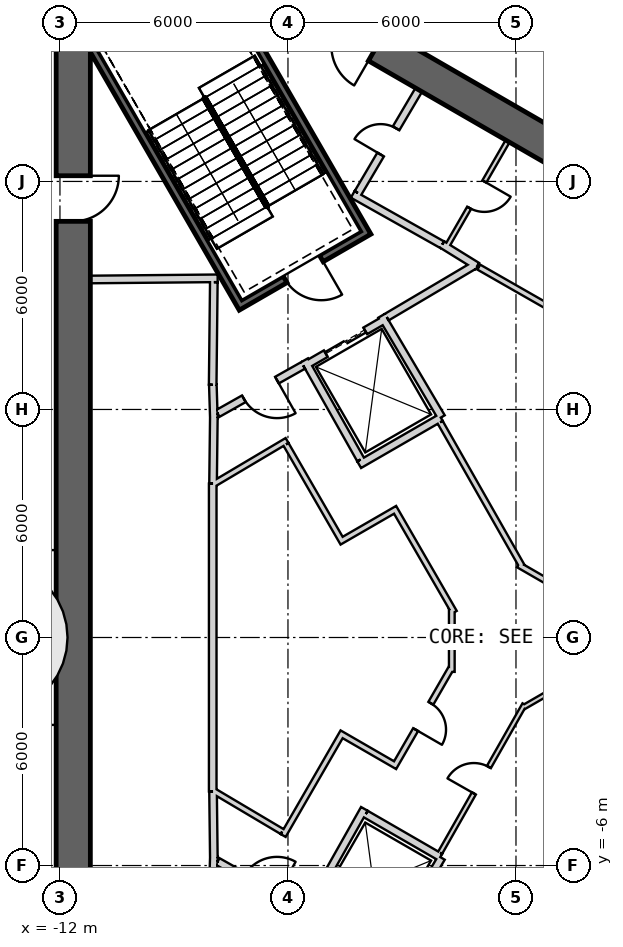
"""IFC4 building model, lengths in metres.
Left out: names, types, materials, properties, quantities, classifications, styles, units other than length and angle.
Written with IfcOpenShell. Run it as: python <this file> out.ifc"""

import sys

from ifc_helpers import new_model, si_unit, direction, frame, frame_2d, origin, place, context, subcontext, project, spatial, rectangle, extrude, element, fill, save


model = new_model("IFC4")
c1 = context("Model", 3, precision=1e-05, world=origin(), true_north=direction((0.0, 1.0)))
c2 = subcontext(c1, "Body", "Model", "MODEL_VIEW")
j1 = project(units=[si_unit("LENGTHUNIT", "METRE"), si_unit("PLANEANGLEUNIT", "RADIAN")], contexts=[c1])
p1 = place(None, origin())
s1 = spatial("IfcSite", under=j1, at=p1, CompositionType="ELEMENT")
p2 = place(p1, origin())
s2 = spatial("IfcBuilding", under=s1, at=p2, CompositionType="ELEMENT")
p3 = place(p2, frame((0.0, 0.0, 283.7)))
s3 = spatial("IfcBuildingStorey", under=s2, at=p3, CompositionType="ELEMENT", Elevation=283.7)
p4 = place(p3, frame((19.475, 2.208, 0.0), z_axis=(0.0, 0.0, 1.0), x_axis=(-0.866028369851, 0.499994862586, 0.0)))
e1 = element("IfcWall", 1, at=p4, inside=s3, PredefinedType="SHEAR", context=c2, shape_type="SweptSolid", body=[
    extrude(rectangle(XDim=31.523, YDim=0.9, at=frame_2d((15.762, 0.0))), origin(), (0.0, 0.0, 1.0), 9.0),
])
p5 = place(p4, frame((3.612, 0.0, 0.0)))
e2 = element("IfcOpeningElement", 2, at=p5, cuts=e1, PredefinedType="OPENING", context=c2, shape_type="SweptSolid", body=[
    extrude(rectangle(XDim=1.2, YDim=2.4, at=frame_2d((0.6, 1.2))), frame((0.0, 0.46, 0.0), z_axis=(0.0, -1.0, 0.0), x_axis=(1.0, 0.0, 0.0)), (0.0, 0.0, 1.0), 0.92),
])
p6 = place(p4, frame((26.712, 0.0, 0.0)))
e3 = element("IfcOpeningElement", 3, at=p6, cuts=e1, PredefinedType="OPENING", context=c2, shape_type="SweptSolid", body=[
    extrude(rectangle(XDim=1.2, YDim=2.4, at=frame_2d((0.6, 1.2))), frame((0.0, 0.46, 0.0), z_axis=(0.0, -1.0, 0.0), x_axis=(1.0, 0.0, 0.0)), (0.0, 0.0, 1.0), 0.92),
])
p7 = place(p3, frame((-11.65, 15.762, 0.0), z_axis=(0.0, 0.0, 1.0), x_axis=(0.0, -1.0, 0.0)))
e4 = element("IfcWall", 4, at=p7, inside=s3, PredefinedType="SHEAR", context=c2, shape_type="SweptSolid", body=[
    extrude(rectangle(XDim=31.523, YDim=0.9, at=frame_2d((15.762, 0.0))), origin(), (0.0, 0.0, 1.0), 9.0),
])
p8 = place(p7, frame((3.612, 0.0, 0.0)))
e5 = element("IfcOpeningElement", 5, at=p8, cuts=e4, PredefinedType="OPENING", context=c2, shape_type="SweptSolid", body=[
    extrude(rectangle(XDim=1.2, YDim=2.4, at=frame_2d((0.6, 1.2))), frame((0.0, 0.46, 0.0), z_axis=(0.0, -1.0, 0.0), x_axis=(1.0, 0.0, 0.0)), (0.0, 0.0, 1.0), 0.92),
])
p9 = place(p7, frame((26.712, 0.0, 0.0)))
e6 = element("IfcOpeningElement", 6, at=p9, cuts=e4, PredefinedType="OPENING", context=c2, shape_type="SweptSolid", body=[
    extrude(rectangle(XDim=1.2, YDim=2.4, at=frame_2d((0.6, 1.2))), frame((0.0, 0.46, 0.0), z_axis=(0.0, -1.0, 0.0), x_axis=(1.0, 0.0, 0.0)), (0.0, 0.0, 1.0), 0.92),
])
p10 = place(p3, frame((-7.825, -17.97, 0.0), z_axis=(0.0, 0.0, 1.0), x_axis=(0.866028369851, 0.499994862586, 0.0)))
e7 = element("IfcWall", 7, at=p10, inside=s3, PredefinedType="SHEAR", context=c2, shape_type="SweptSolid", body=[
    extrude(rectangle(XDim=31.523, YDim=0.9, at=frame_2d((15.762, 0.0))), origin(), (0.0, 0.0, 1.0), 9.0),
])
p11 = place(p10, frame((26.712, 0.0, 0.0)))
e8 = element("IfcOpeningElement", 8, at=p11, cuts=e7, PredefinedType="OPENING", context=c2, shape_type="SweptSolid", body=[
    extrude(rectangle(XDim=1.2, YDim=2.4, at=frame_2d((0.6, 1.2))), frame((0.0, 0.46, 0.0), z_axis=(0.0, -1.0, 0.0), x_axis=(1.0, 0.0, 0.0)), (0.0, 0.0, 1.0), 0.92),
])
p12 = place(p10, frame((3.612, 0.0, 0.0)))
e9 = element("IfcOpeningElement", 9, at=p12, cuts=e7, PredefinedType="OPENING", context=c2, shape_type="SweptSolid", body=[
    extrude(rectangle(XDim=1.2, YDim=2.4, at=frame_2d((0.6, 1.2))), frame((0.0, 0.46, 0.0), z_axis=(0.0, -1.0, 0.0), x_axis=(1.0, 0.0, 0.0)), (0.0, 0.0, 1.0), 0.92),
])
p13 = place(p3, frame((-11.2, 9.42, 0.0), z_axis=(0.0, 0.0, 1.0), x_axis=(0.999957167047, 0.009255488683, 0.0)))
e10 = element("IfcWall", 10, at=p13, inside=s3, PredefinedType="PLUMBINGWALL", context=c2, shape_type="SweptSolid", body=[
    extrude(rectangle(XDim=3.35, YDim=0.2, at=frame_2d((1.675, 0.0))), origin(), (0.0, 0.0, 1.0), 8.65),
])
p14 = place(p3, frame((-7.951, 9.35, 0.0), z_axis=(0.0, 0.0, 1.0), x_axis=(-0.011120469654, -0.999938165666, 0.0)))
e11 = element("IfcWall", 11, at=p14, inside=s3, PredefinedType="PLUMBINGWALL", context=c2, shape_type="SweptSolid", body=[
    extrude(rectangle(XDim=2.7, YDim=0.2, at=frame_2d((1.35, 0.0))), origin(), (0.0, 0.0, 1.0), 8.65),
])
p15 = place(p3, frame((-7.977, 6.65, 0.0), z_axis=(0.0, 0.0, 1.0), x_axis=(0.030861509705, -0.999523670164, 0.0)))
e12 = element("IfcWall", 12, at=p15, inside=s3, PredefinedType="PLUMBINGWALL", context=c2, shape_type="SweptSolid", body=[
    extrude(rectangle(XDim=0.878, YDim=0.2, at=frame_2d((0.439, 0.0))), origin(), (0.0, 0.0, 1.0), 8.65),
])
p16 = place(p3, frame((-7.949, 5.895, 0.0), z_axis=(0.0, 0.0, 1.0), x_axis=(-0.012042535896, -0.999927486035, 0.0)))
e13 = element("IfcWall", 13, at=p16, inside=s3, PredefinedType="PLUMBINGWALL", context=c2, shape_type="SweptSolid", body=[
    extrude(rectangle(XDim=1.845, YDim=0.2, at=frame_2d((0.922, 0.0))), origin(), (0.0, 0.0, 1.0), 8.65),
])
p17 = place(p3, frame((-7.98, 4.05, 0.0), z_axis=(0.0, 0.0, 1.0), x_axis=(0.0, -1.0, 0.0)))
e14 = element("IfcWall", 14, at=p17, inside=s3, PredefinedType="PLUMBINGWALL", context=c2, shape_type="SweptSolid", body=[
    extrude(rectangle(XDim=8.1, YDim=0.2, at=frame_2d((4.05, 0.0))), origin(), (0.0, 0.0, 1.0), 8.65),
])
p18 = place(p3, frame((-7.95, -5.772, 0.0), z_axis=(0.0, 0.0, 1.0), x_axis=(-0.030803413295, -0.999525462272, 0.0)))
e15 = element("IfcWall", 15, at=p18, inside=s3, PredefinedType="PLUMBINGWALL", context=c2, shape_type="SweptSolid", body=[
    extrude(rectangle(XDim=1.078, YDim=0.2, at=frame_2d((0.539, 0.0))), origin(), (0.0, 0.0, 1.0), 8.65),
])
p19 = place(p3, frame((-7.971, -4.05, 0.0), z_axis=(0.0, 0.0, 1.0), x_axis=(0.012042535896, -0.999927486035, 0.0)))
e16 = element("IfcWall", 16, at=p19, inside=s3, PredefinedType="PLUMBINGWALL", context=c2, shape_type="SweptSolid", body=[
    extrude(rectangle(XDim=1.845, YDim=0.2, at=frame_2d((0.922, 0.0))), origin(), (0.0, 0.0, 1.0), 8.65),
])
p20 = place(p3, frame((-11.245, 15.678, -0.4), z_axis=(0.0, 0.0, 1.0), x_axis=(0.499977274689, -0.866038523851, 0.0)))
e17 = element("IfcWall", 17, at=p20, inside=s3, PredefinedType="SHEAR", context=c2, shape_type="SweptSolid", body=[
    extrude(rectangle(XDim=8.1, YDim=0.2, at=frame_2d((4.05, 0.0))), origin(), (0.0, 0.0, 1.0), 9.05),
])
p21 = place(p3, frame((-7.854, 17.405, -0.4), z_axis=(0.0, 0.0, 1.0), x_axis=(0.499997992926, -0.866026562566, 0.0)))
e18 = element("IfcWall", 18, at=p21, inside=s3, PredefinedType="SHEAR", context=c2, shape_type="SweptSolid", body=[
    extrude(rectangle(XDim=7.9, YDim=0.2, at=frame_2d((3.95, 0.0))), origin(), (0.0, 0.0, 1.0), 9.05),
])
p22 = place(p3, frame((-7.159, 8.8, -0.4), z_axis=(0.0, 0.0, 1.0), x_axis=(0.866047807691, 0.499961193289, 0.0)))
e19 = element("IfcWall", 19, at=p22, inside=s3, PredefinedType="SHEAR", context=c2, shape_type="SweptSolid", body=[
    extrude(rectangle(XDim=3.6, YDim=0.2, at=frame_2d((1.8, 0.0))), origin(), (0.0, 0.0, 1.0), 9.05),
])
p23 = place(p22, frame((1.25, 0.0, 0.4)))
e20 = element("IfcOpeningElement", 20, at=p23, cuts=e19, PredefinedType="OPENING", context=c2, shape_type="SweptSolid", body=[
    extrude(rectangle(XDim=1.1, YDim=2.1, at=frame_2d((0.55, 1.05))), frame((0.0, 0.11, 0.0), z_axis=(0.0, -1.0, 0.0), x_axis=(1.0, 0.0, 0.0)), (0.0, 0.0, 1.0), 0.22),
])
p24 = place(p3, frame((-5.524, 7.168, 0.0), z_axis=(0.0, 0.0, 1.0), x_axis=(0.866024647952, 0.500001309137, 0.0)))
e21 = element("IfcWall", 21, at=p24, inside=s3, PredefinedType="PLUMBINGWALL", context=c2, shape_type="SweptSolid", body=[
    extrude(rectangle(XDim=2.4, YDim=0.2, at=frame_2d((1.2, 0.0))), origin(), (0.0, 0.0, 1.0), 8.65),
])
p25 = place(p24, frame((0.6, 0.0, 0.0)))
e22 = element("IfcOpeningElement", 22, at=p25, cuts=e21, PredefinedType="OPENING", context=c2, shape_type="SweptSolid", body=[
    extrude(rectangle(XDim=1.2, YDim=2.4, at=frame_2d((0.6, 1.2))), frame((0.0, 0.11, 0.0), z_axis=(0.0, -1.0, 0.0), x_axis=(1.0, 0.0, 0.0)), (0.0, 0.0, 1.0), 0.22),
])
p26 = place(p3, frame((-3.538, 8.465, 0.0), z_axis=(0.0, 0.0, 1.0), x_axis=(0.508647062354, -0.860975125052, 0.0)))
e23 = element("IfcWall", 23, at=p26, inside=s3, PredefinedType="PLUMBINGWALL", context=c2, shape_type="SweptSolid", body=[
    extrude(rectangle(XDim=3.1, YDim=0.2, at=frame_2d((1.55, 0.0))), origin(), (0.0, 0.0, 1.0), 8.65),
])
p27 = place(p3, frame((-1.979, 5.786, 0.0), z_axis=(0.0, 0.0, 1.0), x_axis=(-0.866016689309, -0.500015093611, 0.0)))
e24 = element("IfcWall", 24, at=p27, inside=s3, PredefinedType="PLUMBINGWALL", context=c2, shape_type="SweptSolid", body=[
    extrude(rectangle(XDim=2.479, YDim=0.2, at=frame_2d((1.24, 0.0))), origin(), (0.0, 0.0, 1.0), 8.65),
])
p28 = place(p3, frame((-5.562, 7.296, 0.0), z_axis=(0.0, 0.0, 1.0), x_axis=(0.49134651263, -0.870964180966, 0.0)))
e25 = element("IfcWall", 25, at=p28, inside=s3, PredefinedType="PLUMBINGWALL", context=c2, shape_type="SweptSolid", body=[
    extrude(rectangle(XDim=3.0, YDim=0.2, at=frame_2d((1.5, 0.0))), origin(), (0.0, 0.0, 1.0), 8.65),
])
p29 = place(p3, frame((-1.961, -5.796, 0.0), z_axis=(0.0, 0.0, 1.0), x_axis=(-0.508647062354, -0.860975125052, 0.0)))
e26 = element("IfcWall", 26, at=p29, inside=s3, PredefinedType="PLUMBINGWALL", context=c2, shape_type="SweptSolid", body=[
    extrude(rectangle(XDim=3.1, YDim=0.2, at=frame_2d((1.55, 0.0))), origin(), (0.0, 0.0, 1.0), 8.65),
])
p30 = place(p3, frame((-3.99, -4.509, 0.0), z_axis=(0.0, 0.0, 1.0), x_axis=(-0.491358283181, -0.870957540612, 0.0)))
e27 = element("IfcWall", 27, at=p30, inside=s3, PredefinedType="PLUMBINGWALL", context=c2, shape_type="SweptSolid", body=[
    extrude(rectangle(XDim=3.2, YDim=0.2, at=frame_2d((1.6, 0.0))), origin(), (0.0, 0.0, 1.0), 8.65),
])
p31 = place(p3, frame((-3.953, -4.646, 0.0), z_axis=(0.0, 0.0, 1.0), x_axis=(0.866065302921, -0.4999308863, 0.0)))
e28 = element("IfcWall", 28, at=p31, inside=s3, PredefinedType="PLUMBINGWALL", context=c2, shape_type="SweptSolid", body=[
    extrude(rectangle(XDim=2.264, YDim=0.2, at=frame_2d((1.132, 0.0))), origin(), (0.0, 0.0, 1.0), 8.65),
])
p32 = place(p3, frame((-0.22, 13.06, 0.0), z_axis=(0.0, 0.0, 1.0), x_axis=(-0.499984717929, -0.866034226713, 0.0)))
e29 = element("IfcWall", 29, at=p32, inside=s3, PredefinedType="PARTITIONING", context=c2, shape_type="SweptSolid", body=[
    extrude(rectangle(XDim=3.25, YDim=0.12, at=frame_2d((1.625, 0.0))), origin(), (0.0, 0.0, 1.0), 8.65),
])
p33 = place(p32, frame((1.225, 0.0, 0.0)))
e30 = element("IfcOpeningElement", 30, at=p33, cuts=e29, PredefinedType="OPENING", context=c2, shape_type="SweptSolid", body=[
    extrude(rectangle(XDim=0.8, YDim=2.1, at=frame_2d((0.4, 1.05))), frame((0.0, 0.07, 0.0), z_axis=(0.0, -1.0, 0.0), x_axis=(1.0, 0.0, 0.0)), (0.0, 0.0, 1.0), 0.14),
])
p34 = place(p3, frame((-1.941, 10.339, 0.0), z_axis=(0.0, 0.0, 1.0), x_axis=(0.850216889117, -0.526432561171, 0.0)))
e31 = element("IfcWall", 31, at=p34, inside=s3, PredefinedType="PARTITIONING", context=c2, shape_type="SweptSolid", body=[
    extrude(rectangle(XDim=1.078, YDim=0.2, at=frame_2d((0.539, 0.0))), origin(), (0.0, 0.0, 1.0), 8.65),
])
p35 = place(p3, frame((5.159, 6.236, 0.0), z_axis=(0.0, 0.0, 1.0), x_axis=(-0.868105023632, 0.496380567654, 0.0)))
e32 = element("IfcWall", 32, at=p35, inside=s3, PredefinedType="PLUMBINGWALL", context=c2, shape_type="SweptSolid", body=[
    extrude(rectangle(XDim=7.072, YDim=0.15, at=frame_2d((3.536, 0.0))), origin(), (0.0, 0.0, 1.0), 8.65),
])
p36 = place(p3, frame((-4.296, 11.659, 0.0), z_axis=(0.0, 0.0, 1.0), x_axis=(0.871534483978, -0.490334215854, 0.0)))
e33 = element("IfcWall", 33, at=p36, inside=s3, PredefinedType="PARTITIONING", context=c2, shape_type="SweptSolid", body=[
    extrude(rectangle(XDim=2.7, YDim=0.2, at=frame_2d((1.35, 0.0))), origin(), (0.0, 0.0, 1.0), 8.65),
])
p37 = place(p3, frame((-2.558, 14.409, 0.0), z_axis=(0.0, 0.0, 1.0), x_axis=(-0.508018930956, -0.861345903683, 0.0)))
e34 = element("IfcWall", 34, at=p37, inside=s3, PredefinedType="PARTITIONING", context=c2, shape_type="SweptSolid", body=[
    extrude(rectangle(XDim=3.15, YDim=0.2, at=frame_2d((1.575, 0.0))), origin(), (0.0, 0.0, 1.0), 8.65),
])
p38 = place(p37, frame((1.175, 0.0, 0.0)))
e35 = element("IfcOpeningElement", 35, at=p38, cuts=e34, PredefinedType="OPENING", context=c2, shape_type="SweptSolid", body=[
    extrude(rectangle(XDim=0.8, YDim=2.1, at=frame_2d((0.4, 1.05))), frame((0.0, 0.11, 0.0), z_axis=(0.0, -1.0, 0.0), x_axis=(1.0, 0.0, 0.0)), (0.0, 0.0, 1.0), 0.22),
])
p39 = place(p3, frame((-1.055, 9.818, 0.0), z_axis=(0.0, 0.0, 1.0), x_axis=(-0.860614334655, -0.50925726994, 0.0)))
e36 = element("IfcWall", 36, at=p39, inside=s3, PredefinedType="PARTITIONING", context=c2, shape_type="SweptSolid", body=[
    extrude(rectangle(XDim=2.726, YDim=0.2, at=frame_2d((1.363, 0.0))), origin(), (0.0, 0.0, 1.0), 8.65),
])
p40 = place(p3, frame((-5.6, 7.16, 0.0), z_axis=(0.0, 0.0, 1.0), x_axis=(-0.871363259478, -0.490638431059, 0.0)))
e37 = element("IfcWall", 37, at=p40, inside=s3, PredefinedType="PARTITIONING", context=c2, shape_type="SweptSolid", body=[
    extrude(rectangle(XDim=2.581, YDim=0.2, at=frame_2d((1.291, 0.0))), origin(), (0.0, 0.0, 1.0), 8.65),
])
p41 = place(p40, frame((0.791, 0.0, 0.0)))
e38 = element("IfcOpeningElement", 38, at=p41, cuts=e37, PredefinedType="OPENING", context=c2, shape_type="SweptSolid", body=[
    extrude(rectangle(XDim=1.0, YDim=2.1, at=frame_2d((0.5, 1.05))), frame((0.0, 0.11, 0.0), z_axis=(0.0, -1.0, 0.0), x_axis=(1.0, 0.0, 0.0)), (0.0, 0.0, 1.0), 0.22),
])
p42 = place(p3, frame((-7.849, -5.894, 0.0), z_axis=(0.0, 0.0, 1.0), x_axis=(0.871363259478, -0.490638431059, 0.0)))
e39 = element("IfcWall", 39, at=p42, inside=s3, PredefinedType="PARTITIONING", context=c2, shape_type="SweptSolid", body=[
    extrude(rectangle(XDim=2.581, YDim=0.2, at=frame_2d((1.291, 0.0))), origin(), (0.0, 0.0, 1.0), 8.65),
])
p43 = place(p42, frame((0.791, 0.0, 0.0)))
e40 = element("IfcOpeningElement", 40, at=p43, cuts=e39, PredefinedType="OPENING", context=c2, shape_type="SweptSolid", body=[
    extrude(rectangle(XDim=1.0, YDim=2.1, at=frame_2d((0.5, 1.05))), frame((0.0, 0.11, 0.0), z_axis=(0.0, -1.0, 0.0), x_axis=(1.0, 0.0, 0.0)), (0.0, 0.0, 1.0), 0.22),
])
p44 = place(p3, frame((0.062, 1.914, 0.0), z_axis=(0.0, 0.0, 1.0), x_axis=(0.866018462269, -0.500012022864, 0.0)))
e41 = element("IfcWall", 41, at=p44, inside=s3, PredefinedType="PLUMBINGWALL", context=c2, shape_type="SweptSolid", body=[
    extrude(rectangle(XDim=1.654, YDim=0.15, at=frame_2d((0.827, 0.0))), origin(), (0.0, 0.0, 1.0), 8.65),
])
p45 = place(p3, frame((-1.994, 5.661, 0.0), z_axis=(0.0, 0.0, 1.0), x_axis=(0.494341211302, -0.869267948798, 0.0)))
e42 = element("IfcWall", 42, at=p45, inside=s3, PredefinedType="PLUMBINGWALL", context=c2, shape_type="SweptSolid", body=[
    extrude(rectangle(XDim=4.361, YDim=0.15, at=frame_2d((2.18, 0.0))), origin(), (0.0, 0.0, 1.0), 8.65),
])
p46 = place(p3, frame((0.224, -1.761, 0.0), z_axis=(0.0, 0.0, 1.0), x_axis=(-0.494327216836, -0.869275907118, 0.0)))
e43 = element("IfcWall", 43, at=p46, inside=s3, PredefinedType="PARTITIONING", context=c2, shape_type="SweptSolid", body=[
    extrude(rectangle(XDim=4.487, YDim=0.12, at=frame_2d((2.244, 0.0))), origin(), (0.0, 0.0, 1.0), 8.65),
])
p47 = place(p46, frame((1.895, 0.0, 0.0)))
e44 = element("IfcOpeningElement", 44, at=p47, cuts=e43, PredefinedType="OPENING", context=c2, shape_type="SweptSolid", body=[
    extrude(rectangle(XDim=0.8, YDim=2.1, at=frame_2d((0.4, 1.05))), frame((0.0, 0.07, 0.0), z_axis=(0.0, -1.0, 0.0), x_axis=(1.0, 0.0, 0.0)), (0.0, 0.0, 1.0), 0.14),
])
p48 = place(p3, frame((1.605, -1.023, 0.0), z_axis=(0.0, 0.0, 1.0), x_axis=(-0.866001581989, -0.50004125829, 0.0)))
e45 = element("IfcWall", 45, at=p48, inside=s3, PredefinedType="PARTITIONING", context=c2, shape_type="SweptSolid", body=[
    extrude(rectangle(XDim=1.635, YDim=0.12, at=frame_2d((0.817, 0.0))), origin(), (0.0, 0.0, 1.0), 8.65),
])
p49 = place(p3, frame((-6.024, 5.183, 0.0), z_axis=(0.0, 0.0, 1.0), x_axis=(-0.860126804455, -0.510080268447, 0.0)))
e46 = element("IfcWall", 46, at=p49, inside=s3, PredefinedType="PLUMBINGWALL", context=c2, shape_type="SweptSolid", body=[
    extrude(rectangle(XDim=2.24, YDim=0.15, at=frame_2d((1.12, 0.0))), origin(), (0.0, 0.0, 1.0), 8.65),
])
p50 = place(p3, frame((-4.551, 2.482, 0.0), z_axis=(0.0, 0.0, 1.0), x_axis=(-0.499990139034, 0.866031096941, 0.0)))
e47 = element("IfcWall", 47, at=p50, inside=s3, PredefinedType="PLUMBINGWALL", context=c2, shape_type="SweptSolid", body=[
    extrude(rectangle(XDim=3.0, YDim=0.15, at=frame_2d((1.5, 0.0))), origin(), (0.0, 0.0, 1.0), 8.65),
])
p51 = place(p3, frame((-3.116, 3.397, 0.0), z_axis=(0.0, 0.0, 1.0), x_axis=(-0.866053003207, -0.499952193351, 0.0)))
e48 = element("IfcWall", 48, at=p51, inside=s3, PredefinedType="PLUMBINGWALL", context=c2, shape_type="SweptSolid", body=[
    extrude(rectangle(XDim=1.625, YDim=0.15, at=frame_2d((0.812, 0.0))), origin(), (0.0, 0.0, 1.0), 8.65),
])
p52 = place(p3, frame((-1.624, 0.663, 0.0), z_axis=(0.0, 0.0, 1.0), x_axis=(-0.500035348339, 0.866004994449, 0.0)))
e49 = element("IfcWall", 49, at=p52, inside=s3, PredefinedType="PLUMBINGWALL", context=c2, shape_type="SweptSolid", body=[
    extrude(rectangle(XDim=3.039, YDim=0.15, at=frame_2d((1.52, 0.0))), origin(), (0.0, 0.0, 1.0), 8.65),
])
p53 = place(p3, frame((-1.689, -0.905, 0.0), z_axis=(0.0, 0.0, 1.0), x_axis=(0.0, 1.0, 0.0)))
e50 = element("IfcWall", 50, at=p53, inside=s3, PredefinedType="PLUMBINGWALL", context=c2, shape_type="SweptSolid", body=[
    extrude(rectangle(XDim=1.656, YDim=0.15, at=frame_2d((0.828, 0.0))), origin(), (0.0, 0.0, 1.0), 8.65),
])
p54 = place(p3, frame((-3.219, -3.425, 0.0), z_axis=(0.0, 0.0, 1.0), x_axis=(0.499996236806, 0.866027576455, 0.0)))
e51 = element("IfcWall", 51, at=p54, inside=s3, PredefinedType="PLUMBINGWALL", context=c2, shape_type="SweptSolid", body=[
    extrude(rectangle(XDim=3.036, YDim=0.15, at=frame_2d((1.518, 0.0))), origin(), (0.0, 0.0, 1.0), 8.65),
])
p55 = place(p54, frame((1.156, 0.0, 0.0)))
e52 = element("IfcOpeningElement", 52, at=p55, cuts=e51, PredefinedType="OPENING", context=c2, shape_type="SweptSolid", body=[
    extrude(rectangle(XDim=0.8, YDim=2.1, at=frame_2d((0.4, 1.05))), frame((0.0, 0.085, 0.0), z_axis=(0.0, -1.0, 0.0), x_axis=(1.0, 0.0, 0.0)), (0.0, 0.0, 1.0), 0.17),
])
p56 = place(p3, frame((-4.653, -2.51, 0.0), z_axis=(0.0, 0.0, 1.0), x_axis=(0.866053003207, -0.499952193351, 0.0)))
e53 = element("IfcWall", 53, at=p56, inside=s3, PredefinedType="PLUMBINGWALL", context=c2, shape_type="SweptSolid", body=[
    extrude(rectangle(XDim=1.625, YDim=0.15, at=frame_2d((0.812, 0.0))), origin(), (0.0, 0.0, 1.0), 8.65),
])
p57 = place(p3, frame((-6.126, -5.21, 0.0), z_axis=(0.0, 0.0, 1.0), x_axis=(0.499990139034, 0.866031096941, 0.0)))
e54 = element("IfcWall", 54, at=p57, inside=s3, PredefinedType="PLUMBINGWALL", context=c2, shape_type="SweptSolid", body=[
    extrude(rectangle(XDim=3.0, YDim=0.15, at=frame_2d((1.5, 0.0))), origin(), (0.0, 0.0, 1.0), 8.65),
])
p58 = place(p3, frame((-7.95, -4.041, 0.0), z_axis=(0.0, 0.0, 1.0), x_axis=(0.860090281069, -0.510141851263, 0.0)))
e55 = element("IfcWall", 55, at=p58, inside=s3, PredefinedType="PLUMBINGWALL", context=c2, shape_type="SweptSolid", body=[
    extrude(rectangle(XDim=2.089, YDim=0.15, at=frame_2d((1.045, 0.0))), origin(), (0.0, 0.0, 1.0), 8.65),
])
p59 = place(p23, origin())
e56 = element("IfcDoor", 56, at=p59, inside=s3, OperationType="SINGLE_SWING_RIGHT", PredefinedType="USERDEFINED", context=c2, shape_type="SweptSolid", body=[
    extrude(rectangle(XDim=1.1, YDim=2.1, at=frame_2d((0.55, 1.05))), frame((0.0, 0.025, 0.0), z_axis=(0.0, -1.0, 0.0), x_axis=(1.0, 0.0, 0.0)), (0.0, 0.0, 1.0), 0.05),
])
fill(e20, e56)
p60 = place(p41, origin())
e57 = element("IfcDoor", 57, at=p60, inside=s3, OperationType="SINGLE_SWING_LEFT", PredefinedType="USERDEFINED", context=c2, shape_type="SweptSolid", body=[
    extrude(rectangle(XDim=1.0, YDim=2.1, at=frame_2d((0.5, 1.05))), frame((0.0, 0.025, 0.0), z_axis=(0.0, -1.0, 0.0), x_axis=(1.0, 0.0, 0.0)), (0.0, 0.0, 1.0), 0.05),
])
fill(e38, e57)
p61 = place(p25, origin())
e58 = element("IfcDoor", 58, at=p61, inside=s3, OperationType="SLIDING_TO_LEFT", PredefinedType="USERDEFINED", context=c2, shape_type="SweptSolid", body=[
    extrude(rectangle(XDim=1.2, YDim=2.4, at=frame_2d((0.6, 1.2))), frame((0.0, 0.025, 0.0), z_axis=(0.0, -1.0, 0.0), x_axis=(1.0, 0.0, 0.0)), (0.0, 0.0, 1.0), 0.05),
])
fill(e22, e58)
p62 = place(p47, origin())
e59 = element("IfcDoor", 59, at=p62, inside=s3, OperationType="SINGLE_SWING_RIGHT", PredefinedType="USERDEFINED", context=c2, shape_type="SweptSolid", body=[
    extrude(rectangle(XDim=0.8, YDim=2.1, at=frame_2d((0.4, 1.05))), frame((0.0, 0.025, 0.0), z_axis=(0.0, -1.0, 0.0), x_axis=(1.0, 0.0, 0.0)), (0.0, 0.0, 1.0), 0.05),
])
fill(e44, e59)
p63 = place(p55, origin())
e60 = element("IfcDoor", 60, at=p63, inside=s3, OperationType="SINGLE_SWING_LEFT", PredefinedType="USERDEFINED", context=c2, shape_type="SweptSolid", body=[
    extrude(rectangle(XDim=0.8, YDim=2.1, at=frame_2d((0.4, 1.05))), frame((0.0, 0.025, 0.0), z_axis=(0.0, -1.0, 0.0), x_axis=(1.0, 0.0, 0.0)), (0.0, 0.0, 1.0), 0.05),
])
fill(e52, e60)
p64 = place(p33, origin())
e61 = element("IfcDoor", 61, at=p64, inside=s3, OperationType="SINGLE_SWING_LEFT", PredefinedType="USERDEFINED", context=c2, shape_type="SweptSolid", body=[
    extrude(rectangle(XDim=0.8, YDim=2.1, at=frame_2d((0.4, 1.05))), frame((0.0, 0.025, 0.0), z_axis=(0.0, -1.0, 0.0), x_axis=(1.0, 0.0, 0.0)), (0.0, 0.0, 1.0), 0.05),
])
fill(e30, e61)
p65 = place(p38, origin())
e62 = element("IfcDoor", 62, at=p65, inside=s3, OperationType="SINGLE_SWING_RIGHT", PredefinedType="USERDEFINED", context=c2, shape_type="SweptSolid", body=[
    extrude(rectangle(XDim=0.8, YDim=2.1, at=frame_2d((0.4, 1.05))), frame((0.0, 0.025, 0.0), z_axis=(0.0, -1.0, 0.0), x_axis=(1.0, 0.0, 0.0)), (0.0, 0.0, 1.0), 0.05),
])
fill(e35, e62)
p66 = place(p8, origin())
e63 = element("IfcDoor", 63, at=p66, inside=s3, OperationType="SINGLE_SWING_LEFT", PredefinedType="USERDEFINED", context=c2, shape_type="SweptSolid", body=[
    extrude(rectangle(XDim=1.2, YDim=2.4, at=frame_2d((0.6, 1.2))), frame((0.0, 0.025, 0.0), z_axis=(0.0, -1.0, 0.0), x_axis=(1.0, 0.0, 0.0)), (0.0, 0.0, 1.0), 0.05),
])
fill(e5, e63)
save(model, sys.argv[1])
